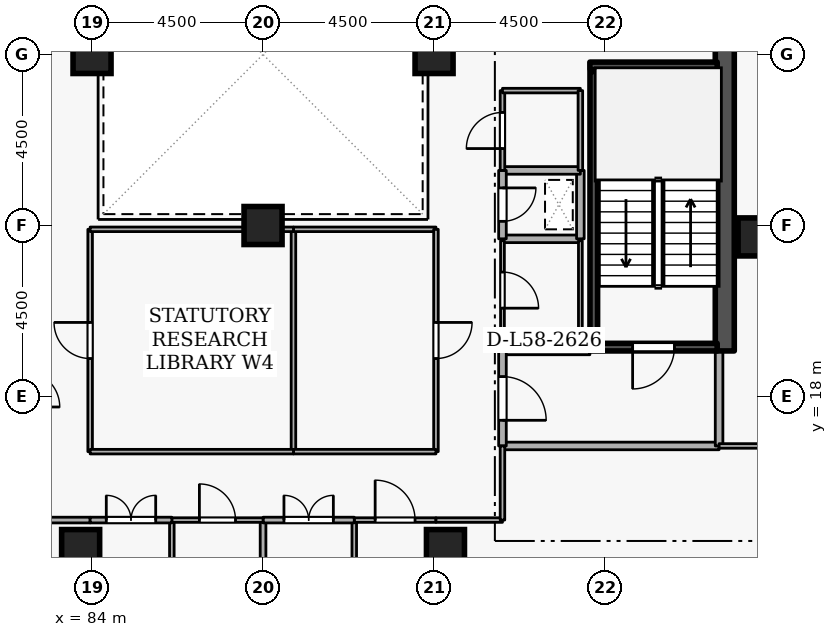
"""IFC4 building model, lengths in metres.
Left out: names, types, materials, properties, quantities, classifications, styles, units other than length and angle.
Written with IfcOpenShell. Run it as: python <this file> out.ifc"""

import sys

from ifc_helpers import new_model, si_unit, direction, frame, frame_2d, origin, origin_2d, place, context, subcontext, project, spatial, rectangle, extrude, element, fill, save


model = new_model("IFC4")
c1 = context("Model", 3, precision=1e-05, world=origin(), true_north=direction((0.0, 1.0)))
c2 = subcontext(c1, "Body", "Model", "MODEL_VIEW")
j1 = project(units=[si_unit("LENGTHUNIT", "METRE"), si_unit("PLANEANGLEUNIT", "RADIAN")], contexts=[c1])
p1 = place(None, origin())
s1 = spatial("IfcSite", under=j1, at=p1, CompositionType="ELEMENT")
p2 = place(p1, origin())
s2 = spatial("IfcBuilding", under=s1, at=p2, CompositionType="ELEMENT")
p3 = place(p2, frame((0.0, 0.0, 218.1)))
s3 = spatial("IfcBuildingStorey", under=s2, at=p3, CompositionType="ELEMENT", Elevation=218.1)
p4 = place(p3, frame((100.65, 19.2, 0.0), z_axis=(0.0, 0.0, 1.0), x_axis=(0.0, 1.0, 0.0)))
e1 = element("IfcWall", 1, at=p4, inside=s3, PredefinedType="SHEAR", context=c2, shape_type="SweptSolid", body=[
    extrude(rectangle(XDim=15.6, YDim=0.5, at=frame_2d((7.8, 0.0))), origin(), (0.0, 0.0, 1.0), 3.6),
])
for number, where, z_axis, x_axis in (
    (2, (93.3, 14.0, 0.0), (0.0, 0.0, 1.0), (1.0, 0.0, 0.0)),
    (3, (83.7, 14.0, 0.0), (0.0, 0.0, 1.0), (1.0, 0.0, 0.0)),
    (4, (101.5, 22.2, 0.0), (0.0, 0.0, 1.0), (1.0, 0.0, 0.0)),
    (5, (93.0, 27.0, 0.0), (0.0, 0.0, 1.0), (1.0, 0.0, 0.0)),
    (6, (84.0, 27.0, 0.0), (0.0, 0.0, 1.0), (1.0, 0.0, 0.0)),
    (7, (88.5, 22.5, 0.0), (0.0, 0.0, 1.0), (1.0, 0.0, 0.0)),
):
    element("IfcColumn", number, at=place(p3, frame(where, z_axis=z_axis, x_axis=x_axis)), inside=s3, PredefinedType="COLUMN", context=c2, shape_type="SweptSolid", body=[
        extrude(rectangle(XDim=1.0, YDim=1.0, at=origin_2d()), origin(), (0.0, 0.0, 1.0), 3.6),
    ])
p5 = place(p3, frame((100.45, 19.3, 0.0), z_axis=(0.0, 0.0, 1.0), x_axis=(-1.0, 0.0, 0.0)))
e8 = element("IfcWall", 8, at=p5, inside=s3, PredefinedType="SHEAR", context=c2, shape_type="SweptSolid", body=[
    extrude(rectangle(XDim=3.35, YDim=0.2, at=frame_2d((1.675, 0.0))), origin(), (0.0, 0.0, 1.0), 3.6),
])
p6 = place(p5, frame((1.125, 0.0, 0.0)))
e9 = element("IfcOpeningElement", 9, at=p6, cuts=e8, PredefinedType="OPENING", context=c2, shape_type="SweptSolid", body=[
    extrude(rectangle(XDim=1.1, YDim=2.1, at=frame_2d((0.55, 1.05))), frame((0.0, 0.11, 0.0), z_axis=(0.0, -1.0, 0.0), x_axis=(1.0, 0.0, 0.0)), (0.0, 0.0, 1.0), 0.22),
])
p7 = place(p3, frame((97.1, 26.7, 0.0), z_axis=(0.0, 0.0, 1.0), x_axis=(1.0, 0.0, 0.0)))
e10 = element("IfcWall", 10, at=p7, inside=s3, PredefinedType="SHEAR", context=c2, shape_type="SweptSolid", body=[
    extrude(rectangle(XDim=3.35, YDim=0.2, at=frame_2d((1.675, 0.0))), origin(), (0.0, 0.0, 1.0), 3.6),
])
p8 = place(p3, frame((97.203, 26.55, 0.0), z_axis=(0.0, 0.0, 1.0), x_axis=(0.0, -1.0, 0.0)))
e11 = element("IfcWall", 11, at=p8, inside=s3, PredefinedType="SHEAR", context=c2, shape_type="SweptSolid", body=[
    extrude(rectangle(XDim=7.1, YDim=0.2, at=frame_2d((3.55, 0.0))), origin(), (0.0, 0.0, 1.0), 3.6),
])
p9 = place(p3, frame((94.8, 16.7, 0.0), z_axis=(0.0, 0.0, 1.0), x_axis=(1.0, 0.0, 0.0)))
e12 = element("IfcWall", 12, at=p9, inside=s3, PredefinedType="STANDARD", context=c2, shape_type="SweptSolid", body=[
    extrude(rectangle(XDim=5.7, YDim=0.2, at=frame_2d((2.85, 0.0))), origin(), (0.0, 0.0, 1.0), 3.26),
])
p10 = place(p3, frame((100.5, 16.7, 0.0), z_axis=(0.0, 0.0, 1.0), x_axis=(0.0, 1.0, 0.0)))
e13 = element("IfcWall", 13, at=p10, inside=s3, PredefinedType="STANDARD", context=c2, shape_type="SweptSolid", body=[
    extrude(rectangle(XDim=2.5, YDim=0.2, at=frame_2d((1.25, 0.0))), origin(), (0.0, 0.0, 1.0), 3.26),
])
p11 = place(p3, frame((97.1, 19.2, 0.0), z_axis=(0.0, 0.0, 1.0), x_axis=(-1.0, 0.0, 0.0)))
e14 = element("IfcWall", 14, at=p11, inside=s3, PredefinedType="STANDARD", context=c2, shape_type="SweptSolid", body=[
    extrude(rectangle(XDim=2.3, YDim=0.2, at=frame_2d((1.15, 0.0))), origin(), (0.0, 0.0, 1.0), 2.465),
])
p12 = place(p3, frame((94.8, 19.2, 0.0), z_axis=(0.0, 0.0, 1.0), x_axis=(0.0, -1.0, 0.0)))
e15 = element("IfcWall", 15, at=p12, inside=s3, PredefinedType="STANDARD", context=c2, shape_type="SweptSolid", body=[
    extrude(rectangle(XDim=2.5, YDim=0.2, at=frame_2d((1.25, 0.0))), origin(), (0.0, 0.0, 1.0), 3.26),
])
p13 = place(p12, frame((0.675, 0.0, 0.0)))
e16 = element("IfcOpeningElement", 16, at=p13, cuts=e15, PredefinedType="OPENING", context=c2, shape_type="SweptSolid", body=[
    extrude(rectangle(XDim=1.15, YDim=2.1, at=frame_2d((0.575, 1.05))), frame((0.0, 0.11, 0.0), z_axis=(0.0, -1.0, 0.0), x_axis=(1.0, 0.0, 0.0)), (0.0, 0.0, 1.0), 0.22),
])
p14 = place(p3, frame((94.8, 22.15, 0.0), z_axis=(0.0, 0.0, 1.0), x_axis=(1.0, 0.0, 0.0)))
e17 = element("IfcWall", 17, at=p14, inside=s3, PredefinedType="STANDARD", context=c2, shape_type="SweptSolid", body=[
    extrude(rectangle(XDim=2.05, YDim=0.2, at=frame_2d((1.025, 0.0))), origin(), (0.0, 0.0, 1.0), 3.26),
])
p15 = place(p3, frame((96.85, 22.15, 0.0), z_axis=(0.0, 0.0, 1.0), x_axis=(0.0, 1.0, 0.0)))
e18 = element("IfcWall", 18, at=p15, inside=s3, PredefinedType="STANDARD", context=c2, shape_type="SweptSolid", body=[
    extrude(rectangle(XDim=1.8, YDim=0.2, at=frame_2d((0.9, 0.0))), origin(), (0.0, 0.0, 1.0), 3.26),
])
p16 = place(p3, frame((96.85, 23.95, 0.0), z_axis=(0.0, 0.0, 1.0), x_axis=(-1.0, 0.0, 0.0)))
e19 = element("IfcWall", 19, at=p16, inside=s3, PredefinedType="STANDARD", context=c2, shape_type="SweptSolid", body=[
    extrude(rectangle(XDim=2.05, YDim=0.2, at=frame_2d((1.025, 0.0))), origin(), (0.0, 0.0, 1.0), 3.26),
])
p17 = place(p3, frame((94.8, 23.95, 0.0), z_axis=(0.0, 0.0, 1.0), x_axis=(0.0, -1.0, 0.0)))
e20 = element("IfcWall", 20, at=p17, inside=s3, PredefinedType="STANDARD", context=c2, shape_type="SweptSolid", body=[
    extrude(rectangle(XDim=1.8, YDim=0.2, at=frame_2d((0.9, 0.0))), origin(), (0.0, 0.0, 1.0), 3.26),
])
p18 = place(p17, frame((0.46, 0.0, 0.0)))
e21 = element("IfcOpeningElement", 21, at=p18, cuts=e20, PredefinedType="OPENING", context=c2, shape_type="SweptSolid", body=[
    extrude(rectangle(XDim=0.88, YDim=2.04, at=frame_2d((0.44, 1.02))), frame((0.0, 0.11, 0.0), z_axis=(0.0, -1.0, 0.0), x_axis=(1.0, 0.0, 0.0)), (0.0, 0.0, 1.0), 0.22),
])
p19 = place(p3, frame((94.8, 19.5, 0.0), z_axis=(0.0, 0.0, 1.0), x_axis=(1.0, 0.0, 0.0)))
e22 = element("IfcWall", 22, at=p19, inside=s3, PredefinedType="PARTITIONING", context=c2, shape_type="SweptSolid", body=[
    extrude(rectangle(XDim=2.05, YDim=0.1, at=frame_2d((1.025, 0.0))), origin(), (0.0, 0.0, 1.0), 2.465),
])
p20 = place(p3, frame((96.85, 19.5, 0.0), z_axis=(0.0, 0.0, 1.0), x_axis=(0.0, 1.0, 0.0)))
e23 = element("IfcWall", 23, at=p20, inside=s3, PredefinedType="PARTITIONING", context=c2, shape_type="SweptSolid", body=[
    extrude(rectangle(XDim=2.6, YDim=0.1, at=frame_2d((1.3, 0.0))), origin(), (0.0, 0.0, 1.0), 3.26),
])
p21 = place(p3, frame((94.8, 22.1, 0.0), z_axis=(0.0, 0.0, 1.0), x_axis=(0.0, -1.0, 0.0)))
e24 = element("IfcWall", 24, at=p21, inside=s3, PredefinedType="PARTITIONING", context=c2, shape_type="SweptSolid", body=[
    extrude(rectangle(XDim=2.6, YDim=0.1, at=frame_2d((1.3, 0.0))), origin(), (0.0, 0.0, 1.0), 3.26),
])
p22 = place(p21, frame((0.825, 0.0, 0.0)))
e25 = element("IfcOpeningElement", 25, at=p22, cuts=e24, PredefinedType="OPENING", context=c2, shape_type="SweptSolid", body=[
    extrude(rectangle(XDim=0.95, YDim=2.1, at=frame_2d((0.475, 1.05))), frame((0.0, 0.06, 0.0), z_axis=(0.0, -1.0, 0.0), x_axis=(1.0, 0.0, 0.0)), (0.0, 0.0, 1.0), 0.12),
])
p23 = place(p3, frame((94.8, 23.95, 0.0), z_axis=(0.0, 0.0, 1.0), x_axis=(0.0, 1.0, 0.0)))
e26 = element("IfcWall", 26, at=p23, inside=s3, PredefinedType="PARTITIONING", context=c2, shape_type="SweptSolid", body=[
    extrude(rectangle(XDim=2.1, YDim=0.12, at=frame_2d((1.05, 0.0))), origin(), (0.0, 0.0, 1.0), 3.26),
])
p24 = place(p23, frame((0.575, 0.0, 0.0)))
e27 = element("IfcOpeningElement", 27, at=p24, cuts=e26, PredefinedType="OPENING", context=c2, shape_type="SweptSolid", body=[
    extrude(rectangle(XDim=0.95, YDim=2.1, at=frame_2d((0.475, 1.05))), frame((0.0, 0.07, 0.0), z_axis=(0.0, -1.0, 0.0), x_axis=(1.0, 0.0, 0.0)), (0.0, 0.0, 1.0), 0.14),
])
p25 = place(p3, frame((94.8, 26.05, 0.0), z_axis=(0.0, 0.0, 1.0), x_axis=(1.0, 0.0, 0.0)))
e28 = element("IfcWall", 28, at=p25, inside=s3, PredefinedType="PARTITIONING", context=c2, shape_type="SweptSolid", body=[
    extrude(rectangle(XDim=2.05, YDim=0.12, at=frame_2d((1.025, 0.0))), origin(), (0.0, 0.0, 1.0), 3.26),
])
p26 = place(p3, frame((96.85, 26.05, 0.0), z_axis=(0.0, 0.0, 1.0), x_axis=(0.0, -1.0, 0.0)))
e29 = element("IfcWall", 29, at=p26, inside=s3, PredefinedType="PARTITIONING", context=c2, shape_type="SweptSolid", body=[
    extrude(rectangle(XDim=2.1, YDim=0.12, at=frame_2d((1.05, 0.0))), origin(), (0.0, 0.0, 1.0), 3.26),
])
p27 = place(p3, frame((90.9, 3.28, 0.0), z_axis=(0.0, 0.0, 1.0), x_axis=(0.0, 1.0, 0.0)))
e30 = element("IfcWall", 30, at=p27, inside=s3, PredefinedType="PARTITIONING", context=c2, shape_type="SweptSolid", body=[
    extrude(rectangle(XDim=11.47, YDim=0.12, at=frame_2d((5.735, 0.0))), origin(), (0.0, 0.0, 1.0), 3.26),
])
p28 = place(p3, frame((90.9, 14.75, 0.0), z_axis=(0.0, 0.0, 1.0), x_axis=(1.0, 0.0, 0.0)))
e31 = element("IfcWall", 31, at=p28, inside=s3, PredefinedType="PARTITIONING", context=c2, shape_type="SweptSolid", body=[
    extrude(rectangle(XDim=2.15, YDim=0.12, at=frame_2d((1.075, 0.0))), origin(), (0.0, 0.0, 1.0), 3.26),
])
p29 = place(p28, frame((0.55, 0.0, 0.0)))
e32 = element("IfcOpeningElement", 32, at=p29, cuts=e31, PredefinedType="OPENING", context=c2, shape_type="SweptSolid", body=[
    extrude(rectangle(XDim=1.05, YDim=2.1, at=frame_2d((0.525, 1.05))), frame((0.0, 0.07, 0.0), z_axis=(0.0, -1.0, 0.0), x_axis=(1.0, 0.0, 0.0)), (0.0, 0.0, 1.0), 0.14),
])
p30 = place(p3, frame((93.05, 14.75, 0.0), z_axis=(0.0, 0.0, 1.0), x_axis=(1.0, 0.0, 0.0)))
e33 = element("IfcWall", 33, at=p30, inside=s3, PredefinedType="PARTITIONING", context=c2, shape_type="SweptSolid", body=[
    extrude(rectangle(XDim=1.75, YDim=0.12, at=frame_2d((0.875, 0.0))), origin(), (0.0, 0.0, 1.0), 3.26),
])
p31 = place(p3, frame((94.8, 14.75, 0.0), z_axis=(0.0, 0.0, 1.0), x_axis=(0.0, 1.0, 0.0)))
e34 = element("IfcWall", 34, at=p31, inside=s3, PredefinedType="PARTITIONING", context=c2, shape_type="SweptSolid", body=[
    extrude(rectangle(XDim=1.95, YDim=0.12, at=frame_2d((0.975, 0.0))), origin(), (0.0, 0.0, 1.0), 3.26),
])
p32 = place(p3, frame((100.5, 16.7, 0.0), z_axis=(0.0, 0.0, 1.0), x_axis=(1.0, 0.0, 0.0)))
e35 = element("IfcWall", 35, at=p32, inside=s3, PredefinedType="PARTITIONING", context=c2, shape_type="SweptSolid", body=[
    extrude(rectangle(XDim=5.72, YDim=0.12, at=frame_2d((2.86, 0.0))), origin(), (0.0, 0.0, 1.0), 3.26),
])
p33 = place(p3, frame((88.5, 3.28, 0.0), z_axis=(0.0, 0.0, 1.0), x_axis=(0.0, 1.0, 0.0)))
e36 = element("IfcWall", 36, at=p33, inside=s3, PredefinedType="PARTITIONING", context=c2, shape_type="SweptSolid", body=[
    extrude(rectangle(XDim=11.47, YDim=0.15, at=frame_2d((5.735, 0.0))), origin(), (0.0, 0.0, 1.0), 2.802),
])
p34 = place(p3, frame((88.5, 14.75, 0.0), z_axis=(0.0, 0.0, 1.0), x_axis=(1.0, 0.0, 0.0)))
e37 = element("IfcWall", 37, at=p34, inside=s3, PredefinedType="PARTITIONING", context=c2, shape_type="SweptSolid", body=[
    extrude(rectangle(XDim=2.4, YDim=0.15, at=frame_2d((1.2, 0.0))), origin(), (0.0, 0.0, 1.0), 3.26),
])
p35 = place(p34, frame((0.55, 0.0, 0.0)))
e38 = element("IfcOpeningElement", 38, at=p35, cuts=e37, PredefinedType="OPENING", context=c2, shape_type="SweptSolid", body=[
    extrude(rectangle(XDim=1.3, YDim=2.12, at=frame_2d((0.65, 1.06))), frame((0.0, 0.085, 0.0), z_axis=(0.0, -1.0, 0.0), x_axis=(1.0, 0.0, 0.0)), (0.0, 0.0, 1.0), 0.17),
])
p36 = place(p3, frame((86.1, 3.28, 0.0), z_axis=(0.0, 0.0, 1.0), x_axis=(0.0, 1.0, 0.0)))
e39 = element("IfcWall", 39, at=p36, inside=s3, PredefinedType="PARTITIONING", context=c2, shape_type="SweptSolid", body=[
    extrude(rectangle(XDim=11.47, YDim=0.12, at=frame_2d((5.735, 0.0))), origin(), (0.0, 0.0, 1.0), 3.26),
])
p37 = place(p3, frame((86.1, 14.75, 0.0), z_axis=(0.0, 0.0, 1.0), x_axis=(1.0, 0.0, 0.0)))
e40 = element("IfcWall", 40, at=p37, inside=s3, PredefinedType="PARTITIONING", context=c2, shape_type="SweptSolid", body=[
    extrude(rectangle(XDim=2.4, YDim=0.12, at=frame_2d((1.2, 0.0))), origin(), (0.0, 0.0, 1.0), 3.26),
])
p38 = place(p37, frame((0.725, 0.0, 0.0)))
e41 = element("IfcOpeningElement", 41, at=p38, cuts=e40, PredefinedType="OPENING", context=c2, shape_type="SweptSolid", body=[
    extrude(rectangle(XDim=0.95, YDim=2.1, at=frame_2d((0.475, 1.05))), frame((0.0, 0.07, 0.0), z_axis=(0.0, -1.0, 0.0), x_axis=(1.0, 0.0, 0.0)), (0.0, 0.0, 1.0), 0.14),
])
p39 = place(p3, frame((82.2, 14.75, 0.0), z_axis=(0.0, 0.0, 1.0), x_axis=(1.0, 0.0, 0.0)))
e42 = element("IfcWall", 42, at=p39, inside=s3, PredefinedType="PARTITIONING", context=c2, shape_type="SweptSolid", body=[
    extrude(rectangle(XDim=1.75, YDim=0.15, at=frame_2d((0.875, 0.0))), origin(), (0.0, 0.0, 1.0), 3.26),
])
p40 = place(p3, frame((83.95, 14.75, 0.0), z_axis=(0.0, 0.0, 1.0), x_axis=(1.0, 0.0, 0.0)))
e43 = element("IfcWall", 43, at=p40, inside=s3, PredefinedType="PARTITIONING", context=c2, shape_type="SweptSolid", body=[
    extrude(rectangle(XDim=2.15, YDim=0.15, at=frame_2d((1.075, 0.0))), origin(), (0.0, 0.0, 1.0), 3.26),
])
p41 = place(p40, frame((0.425, 0.0, 0.0)))
e44 = element("IfcOpeningElement", 44, at=p41, cuts=e43, PredefinedType="OPENING", context=c2, shape_type="SweptSolid", body=[
    extrude(rectangle(XDim=1.3, YDim=2.12, at=frame_2d((0.65, 1.06))), frame((0.0, 0.085, 0.0), z_axis=(0.0, -1.0, 0.0), x_axis=(1.0, 0.0, 0.0)), (0.0, 0.0, 1.0), 0.17),
])
p42 = place(p3, frame((89.3, 16.55, 0.0), z_axis=(0.0, 0.0, 1.0), x_axis=(0.0, 1.0, 0.0)))
e45 = element("IfcWall", 45, at=p42, inside=s3, PredefinedType="PARTITIONING", context=c2, shape_type="SweptSolid", body=[
    extrude(rectangle(XDim=5.85, YDim=0.12, at=frame_2d((2.925, 0.0))), origin(), (0.0, 0.0, 1.0), 3.26),
])
p43 = place(p3, frame((89.3, 22.4, 0.0), z_axis=(0.0, 0.0, 1.0), x_axis=(1.0, 0.0, 0.0)))
e46 = element("IfcWall", 46, at=p43, inside=s3, PredefinedType="PARTITIONING", context=c2, shape_type="SweptSolid", body=[
    extrude(rectangle(XDim=3.75, YDim=0.12, at=frame_2d((1.875, 0.0))), origin(), (0.0, 0.0, 1.0), 3.26),
])
p44 = place(p3, frame((93.05, 22.4, 0.0), z_axis=(0.0, 0.0, 1.0), x_axis=(0.0, -1.0, 0.0)))
e47 = element("IfcWall", 47, at=p44, inside=s3, PredefinedType="PARTITIONING", context=c2, shape_type="SweptSolid", body=[
    extrude(rectangle(XDim=5.85, YDim=0.12, at=frame_2d((2.925, 0.0))), origin(), (0.0, 0.0, 1.0), 3.26),
])
p45 = place(p44, frame((2.45, 0.0, 0.0)))
e48 = element("IfcOpeningElement", 48, at=p45, cuts=e47, PredefinedType="OPENING", context=c2, shape_type="SweptSolid", body=[
    extrude(rectangle(XDim=0.95, YDim=2.1, at=frame_2d((0.475, 1.05))), frame((0.0, 0.07, 0.0), z_axis=(0.0, -1.0, 0.0), x_axis=(1.0, 0.0, 0.0)), (0.0, 0.0, 1.0), 0.14),
])
p46 = place(p3, frame((93.05, 16.55, 0.0), z_axis=(0.0, 0.0, 1.0), x_axis=(-1.0, 0.0, 0.0)))
e49 = element("IfcWall", 49, at=p46, inside=s3, PredefinedType="PARTITIONING", context=c2, shape_type="SweptSolid", body=[
    extrude(rectangle(XDim=3.75, YDim=0.12, at=frame_2d((1.875, 0.0))), origin(), (0.0, 0.0, 1.0), 3.26),
])
p47 = place(p3, frame((83.95, 16.55, 0.0), z_axis=(0.0, 0.0, 1.0), x_axis=(0.0, 1.0, 0.0)))
e50 = element("IfcWall", 50, at=p47, inside=s3, PredefinedType="PARTITIONING", context=c2, shape_type="SweptSolid", body=[
    extrude(rectangle(XDim=5.85, YDim=0.12, at=frame_2d((2.925, 0.0))), origin(), (0.0, 0.0, 1.0), 3.26),
])
p48 = place(p47, frame((2.45, 0.0, 0.0)))
e51 = element("IfcOpeningElement", 51, at=p48, cuts=e50, PredefinedType="OPENING", context=c2, shape_type="SweptSolid", body=[
    extrude(rectangle(XDim=0.95, YDim=2.1, at=frame_2d((0.475, 1.05))), frame((0.0, 0.07, 0.0), z_axis=(0.0, -1.0, 0.0), x_axis=(1.0, 0.0, 0.0)), (0.0, 0.0, 1.0), 0.14),
])
for number, where, z_axis, x_axis in (
    (52, (83.95, 22.4, 0.0), (0.0, 0.0, 1.0), (1.0, 0.0, 0.0)),
    (53, (89.3, 16.55, 0.0), (0.0, 0.0, 1.0), (-1.0, 0.0, 0.0)),
):
    element("IfcWall", number, at=place(p3, frame(where, z_axis=z_axis, x_axis=x_axis)), inside=s3, PredefinedType="PARTITIONING", context=c2, shape_type="SweptSolid", body=[
        extrude(rectangle(XDim=5.35, YDim=0.12, at=frame_2d((2.675, 0.0))), origin(), (0.0, 0.0, 1.0), 3.26),
    ])
p49 = place(p6, origin())
e54 = element("IfcDoor", 54, at=p49, inside=s3, OperationType="SINGLE_SWING_RIGHT", PredefinedType="DOOR", context=c2, shape_type="SweptSolid", body=[
    extrude(rectangle(XDim=1.1, YDim=2.1, at=frame_2d((0.55, 1.05))), frame((0.0, 0.025, 0.0), z_axis=(0.0, -1.0, 0.0), x_axis=(1.0, 0.0, 0.0)), (0.0, 0.0, 1.0), 0.05),
])
fill(e9, e54)
p50 = place(p13, origin())
e55 = element("IfcDoor", 55, at=p50, inside=s3, OperationType="SINGLE_SWING_RIGHT", PredefinedType="DOOR", context=c2, shape_type="SweptSolid", body=[
    extrude(rectangle(XDim=1.15, YDim=2.1, at=frame_2d((0.575, 1.05))), frame((0.0, 0.025, 0.0), z_axis=(0.0, -1.0, 0.0), x_axis=(1.0, 0.0, 0.0)), (0.0, 0.0, 1.0), 0.05),
])
fill(e16, e55)
p51 = place(p18, origin())
e56 = element("IfcDoor", 56, at=p51, inside=s3, OperationType="SINGLE_SWING_LEFT", PredefinedType="DOOR", context=c2, shape_type="SweptSolid", body=[
    extrude(rectangle(XDim=0.88, YDim=2.04, at=frame_2d((0.44, 1.02))), frame((0.0, 0.025, 0.0), z_axis=(0.0, -1.0, 0.0), x_axis=(1.0, 0.0, 0.0)), (0.0, 0.0, 1.0), 0.05),
])
fill(e21, e56)
p52 = place(p22, origin())
e57 = element("IfcDoor", 57, at=p52, inside=s3, OperationType="SINGLE_SWING_RIGHT", PredefinedType="DOOR", context=c2, shape_type="SweptSolid", body=[
    extrude(rectangle(XDim=0.95, YDim=2.1, at=frame_2d((0.475, 1.05))), frame((0.0, 0.025, 0.0), z_axis=(0.0, -1.0, 0.0), x_axis=(1.0, 0.0, 0.0)), (0.0, 0.0, 1.0), 0.05),
])
fill(e25, e57)
p53 = place(p24, origin())
e58 = element("IfcDoor", 58, at=p53, inside=s3, OperationType="SINGLE_SWING_LEFT", PredefinedType="DOOR", context=c2, shape_type="SweptSolid", body=[
    extrude(rectangle(XDim=0.95, YDim=2.1, at=frame_2d((0.475, 1.05))), frame((0.0, 0.025, 0.0), z_axis=(0.0, -1.0, 0.0), x_axis=(1.0, 0.0, 0.0)), (0.0, 0.0, 1.0), 0.05),
])
fill(e27, e58)
p54 = place(p29, origin())
e59 = element("IfcDoor", 59, at=p54, inside=s3, OperationType="SINGLE_SWING_LEFT", PredefinedType="DOOR", context=c2, shape_type="SweptSolid", body=[
    extrude(rectangle(XDim=1.05, YDim=2.1, at=frame_2d((0.525, 1.05))), frame((0.0, 0.025, 0.0), z_axis=(0.0, -1.0, 0.0), x_axis=(1.0, 0.0, 0.0)), (0.0, 0.0, 1.0), 0.05),
])
fill(e32, e59)
p55 = place(p35, origin())
e60 = element("IfcDoor", 60, at=p55, inside=s3, OperationType="DOUBLE_DOOR_SINGLE_SWING", PredefinedType="DOOR", context=c2, shape_type="SweptSolid", body=[
    extrude(rectangle(XDim=1.3, YDim=2.12, at=frame_2d((0.65, 1.06))), frame((0.0, 0.025, 0.0), z_axis=(0.0, -1.0, 0.0), x_axis=(1.0, 0.0, 0.0)), (0.0, 0.0, 1.0), 0.05),
])
fill(e38, e60)
p56 = place(p38, origin())
e61 = element("IfcDoor", 61, at=p56, inside=s3, OperationType="SINGLE_SWING_LEFT", PredefinedType="DOOR", context=c2, shape_type="SweptSolid", body=[
    extrude(rectangle(XDim=0.95, YDim=2.1, at=frame_2d((0.475, 1.05))), frame((0.0, 0.025, 0.0), z_axis=(0.0, -1.0, 0.0), x_axis=(1.0, 0.0, 0.0)), (0.0, 0.0, 1.0), 0.05),
])
fill(e41, e61)
p57 = place(p41, origin())
e62 = element("IfcDoor", 62, at=p57, inside=s3, OperationType="DOUBLE_DOOR_SINGLE_SWING", PredefinedType="DOOR", context=c2, shape_type="SweptSolid", body=[
    extrude(rectangle(XDim=1.3, YDim=2.12, at=frame_2d((0.65, 1.06))), frame((0.0, 0.025, 0.0), z_axis=(0.0, -1.0, 0.0), x_axis=(1.0, 0.0, 0.0)), (0.0, 0.0, 1.0), 0.05),
])
fill(e44, e62)
p58 = place(p45, origin())
e63 = element("IfcDoor", 63, at=p58, inside=s3, OperationType="SINGLE_SWING_LEFT", PredefinedType="DOOR", context=c2, shape_type="SweptSolid", body=[
    extrude(rectangle(XDim=0.95, YDim=2.1, at=frame_2d((0.475, 1.05))), frame((0.0, 0.025, 0.0), z_axis=(0.0, -1.0, 0.0), x_axis=(1.0, 0.0, 0.0)), (0.0, 0.0, 1.0), 0.05),
])
fill(e48, e63)
p59 = place(p48, origin())
e64 = element("IfcDoor", 64, at=p59, inside=s3, OperationType="SINGLE_SWING_RIGHT", PredefinedType="DOOR", context=c2, shape_type="SweptSolid", body=[
    extrude(rectangle(XDim=0.95, YDim=2.1, at=frame_2d((0.475, 1.05))), frame((0.0, 0.025, 0.0), z_axis=(0.0, -1.0, 0.0), x_axis=(1.0, 0.0, 0.0)), (0.0, 0.0, 1.0), 0.05),
])
fill(e51, e64)
save(model, sys.argv[1])
